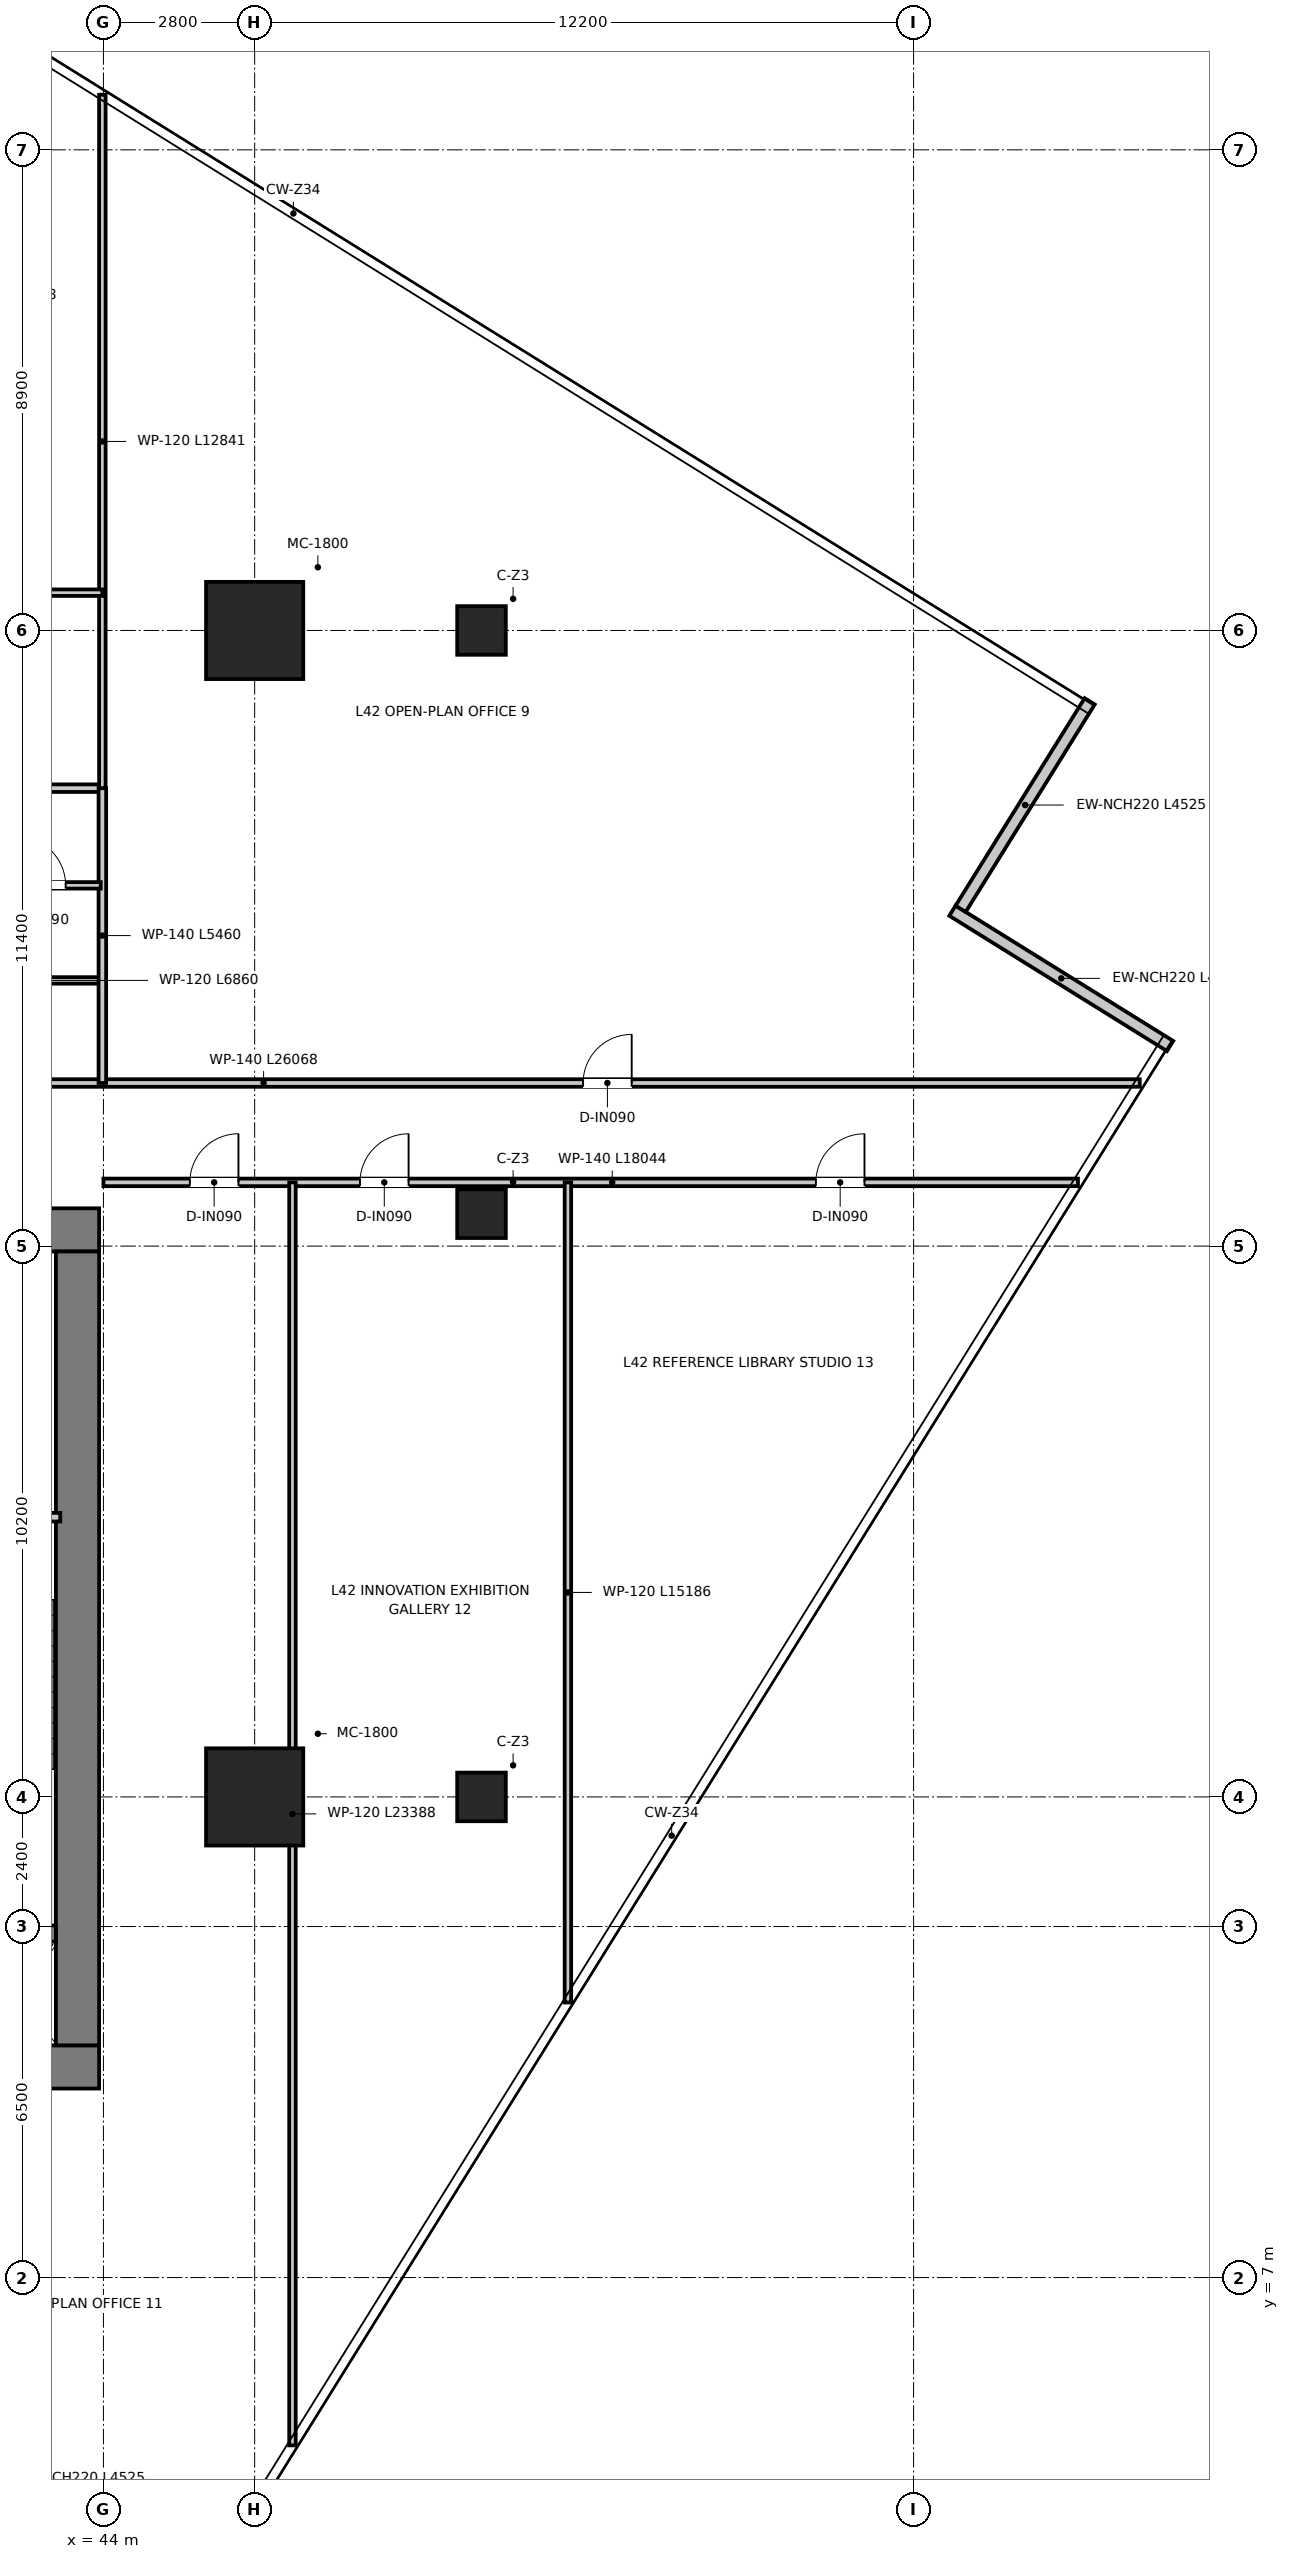
"""IFC4 building model, lengths in metres.
Left out: names, types, materials, properties, quantities, classifications, styles, units other than length and angle.
Written with IfcOpenShell. Run it as: python <this file> out.ifc"""

import sys

from ifc_helpers import new_model, si_unit, direction, frame, frame_2d, origin, origin_2d, place, context, subcontext, project, spatial, rectangle, extrude, source, transform, mapped, element, fill, save


model = new_model("IFC4")
c1 = context("Model", 3, precision=1e-05, world=origin(), true_north=direction((0.0, 1.0)))
c2 = subcontext(c1, "Body", "Model", "MODEL_VIEW")
j1 = project(units=[si_unit("LENGTHUNIT", "METRE"), si_unit("PLANEANGLEUNIT", "RADIAN")], contexts=[c1])
p1 = place(None, origin())
s1 = spatial("IfcSite", under=j1, at=p1, CompositionType="ELEMENT")
p2 = place(p1, origin())
s2 = spatial("IfcBuilding", under=s1, at=p2, CompositionType="ELEMENT")
p3 = place(p2, frame((0.0, 0.0, 173.85)))
s3 = spatial("IfcBuildingStorey", under=s2, at=p3, CompositionType="ELEMENT", Elevation=173.85)
p4 = place(p3, frame((28.08, 10.9, 0.0), z_axis=(0.0, 0.0, 1.0), x_axis=(1.0, 0.0, 0.0)))
e1 = element("IfcWall", 1, at=p4, inside=s3, PredefinedType="SHEAR", context=c2, shape_type="SweptSolid", body=[
    extrude(rectangle(XDim=15.84, YDim=0.8, at=frame_2d((7.92, 0.0))), origin(), (0.0, 0.0, 1.0), 3.95),
])
p5 = place(p3, frame((28.08, 26.4, 0.0), z_axis=(0.0, 0.0, 1.0), x_axis=(1.0, 0.0, 0.0)))
e2 = element("IfcWall", 2, at=p5, inside=s3, PredefinedType="SHEAR", context=c2, shape_type="SweptSolid", body=[
    extrude(rectangle(XDim=15.84, YDim=0.8, at=frame_2d((7.92, 0.0))), origin(), (0.0, 0.0, 1.0), 3.95),
])
p6 = place(p5, frame((7.22, 0.0, 0.0)))
e3 = element("IfcOpeningElement", 3, at=p6, cuts=e2, PredefinedType="OPENING", context=c2, shape_type="SweptSolid", body=[
    extrude(rectangle(XDim=1.4, YDim=2.2, at=frame_2d((0.7, 1.1))), frame((0.0, 0.41, 0.0), z_axis=(0.0, -1.0, 0.0), x_axis=(1.0, 0.0, 0.0)), (0.0, 0.0, 1.0), 0.82),
])
p7 = place(p5, frame((1.775, 0.0, 0.0)))
e4 = element("IfcOpeningElement", 4, at=p7, cuts=e2, PredefinedType="OPENING", context=c2, shape_type="SweptSolid", body=[
    extrude(rectangle(XDim=1.05, YDim=2.1, at=frame_2d((0.525, 1.05))), frame((0.0, 0.41, 0.0), z_axis=(0.0, -1.0, 0.0), x_axis=(1.0, 0.0, 0.0)), (0.0, 0.0, 1.0), 0.82),
])
p8 = place(p5, frame((13.015, 0.0, 0.0)))
e5 = element("IfcOpeningElement", 5, at=p8, cuts=e2, PredefinedType="OPENING", context=c2, shape_type="SweptSolid", body=[
    extrude(rectangle(XDim=1.05, YDim=2.1, at=frame_2d((0.525, 1.05))), frame((0.0, 0.41, 0.0), z_axis=(0.0, -1.0, 0.0), x_axis=(1.0, 0.0, 0.0)), (0.0, 0.0, 1.0), 0.82),
])
p9 = place(p3, frame((43.52, 11.3, 0.0), z_axis=(0.0, 0.0, 1.0), x_axis=(0.0, 1.0, 0.0)))
e6 = element("IfcWall", 6, at=p9, inside=s3, PredefinedType="SHEAR", context=c2, shape_type="SweptSolid", body=[
    extrude(rectangle(XDim=14.7, YDim=0.8, at=frame_2d((7.35, 0.0))), origin(), (0.0, 0.0, 1.0), 3.95),
])
p10 = place(p3, frame((40.02, 13.37, 0.0), z_axis=(0.0, 0.0, 1.0), x_axis=(1.0, 0.0, 0.0)))
e7 = element("IfcWall", 7, at=p10, inside=s3, PredefinedType="SHEAR", context=c2, shape_type="SweptSolid", body=[
    extrude(rectangle(XDim=3.1, YDim=0.3, at=frame_2d((1.55, 0.0))), origin(), (0.0, 0.0, 1.0), 3.95),
])
m1 = source(origin(), c2, "Body", "SweptSolid", [
    extrude(rectangle(XDim=1.8, YDim=1.8, at=origin_2d()), origin(), (0.0, 0.0, 1.0), 3.95),
])
for number, where, z_axis, x_axis in (
    (8, (46.8, 15.9, 0.0), (0.0, 0.0, 1.0), (1.0, 0.0, 0.0)),
    (9, (46.8, 37.5, 0.0), (0.0, 0.0, 1.0), (1.0, 0.0, 0.0)),
):
    element("IfcColumn", number, at=place(p3, frame(where, z_axis=z_axis, x_axis=x_axis)), inside=s3, PredefinedType="USERDEFINED", context=c2, shape_type="MappedRepresentation", body=[
        mapped(m1, transform((0.0, 0.0, 0.0), x_axis=(1.0, 0.0, 0.0), y_axis=(0.0, 1.0, 0.0), z_axis=(0.0, 0.0, 1.0), scale=1.0)),
    ])
m2 = source(origin(), c2, "Body", "SweptSolid", [
    extrude(rectangle(XDim=0.9, YDim=0.9, at=origin_2d()), origin(), (0.0, 0.0, 1.0), 3.95),
])
for number, where, z_axis, x_axis in (
    (10, (51.0, 37.5, 0.0), (0.0, 0.0, 1.0), (1.0, 0.0, 0.0)),
    (11, (51.0, 26.7, 0.0), (0.0, 0.0, 1.0), (1.0, 0.0, 0.0)),
    (12, (51.0, 15.9, 0.0), (0.0, 0.0, 1.0), (1.0, 0.0, 0.0)),
):
    element("IfcColumn", number, at=place(p3, frame(where, z_axis=z_axis, x_axis=x_axis)), inside=s3, PredefinedType="COLUMN", context=c2, shape_type="MappedRepresentation", body=[
        mapped(m2, transform((0.0, 0.0, 0.0), x_axis=(1.0, 0.0, 0.0), y_axis=(0.0, 1.0, 0.0), z_axis=(0.0, 0.0, 1.0), scale=1.0)),
    ])
p11 = place(p3, frame((63.749, 29.805, 0.0), z_axis=(0.0, 0.0, 1.0), x_axis=(-0.84921299194, 0.528050465694, 0.0)))
e13 = element("IfcWall", 13, at=p11, inside=s3, PredefinedType="ELEMENTEDWALL", context=c2, shape_type="SweptSolid", body=[
    extrude(rectangle(XDim=4.745, YDim=0.22, at=frame_2d((2.373, 0.0))), origin(), (0.0, 0.0, 1.0), 3.67),
])
p12 = place(p3, frame((59.871, 32.346, 0.0), z_axis=(0.0, 0.0, 1.0), x_axis=(0.528062437074, 0.849205547881, 0.0)))
e14 = element("IfcWall", 14, at=p12, inside=s3, PredefinedType="ELEMENTEDWALL", context=c2, shape_type="SweptSolid", body=[
    extrude(rectangle(XDim=4.525, YDim=0.22, at=frame_2d((2.262, 0.0))), origin(), (0.0, 0.0, 1.0), 3.67),
])
p13 = place(p3, frame((40.04, 21.08, 0.0), z_axis=(0.0, 0.0, 1.0), x_axis=(1.0, 0.0, 0.0)))
e15 = element("IfcWall", 15, at=p13, inside=s3, PredefinedType="PARTITIONING", context=c2, shape_type="SweptSolid", body=[
    extrude(rectangle(XDim=3.16, YDim=0.16, at=frame_2d((1.58, 0.0))), origin(), (0.0, 0.0, 1.0), 3.67),
])
p14 = place(p13, frame((1.055, 0.0, 0.0)))
e16 = element("IfcOpeningElement", 16, at=p14, cuts=e15, PredefinedType="OPENING", context=c2, shape_type="SweptSolid", body=[
    extrude(rectangle(XDim=1.05, YDim=2.1, at=frame_2d((0.525, 1.05))), frame((0.0, 0.09, 0.0), z_axis=(0.0, -1.0, 0.0), x_axis=(1.0, 0.0, 0.0)), (0.0, 0.0, 1.0), 0.18),
])
p15 = place(p3, frame((37.12, 29.12, 0.0), z_axis=(0.0, 0.0, 1.0), x_axis=(1.0, 0.0, 0.0)))
e17 = element("IfcWall", 17, at=p15, inside=s3, PredefinedType="PARTITIONING", context=c2, shape_type="SweptSolid", body=[
    extrude(rectangle(XDim=26.068, YDim=0.14, at=frame_2d((13.034, 0.0))), origin(), (0.0, 0.0, 1.0), 3.03),
])
p16 = place(p15, frame((3.03, 0.0, 0.0)))
e18 = element("IfcOpeningElement", 18, at=p16, cuts=e17, PredefinedType="OPENING", context=c2, shape_type="SweptSolid", body=[
    extrude(rectangle(XDim=0.9, YDim=2.1, at=frame_2d((0.45, 1.05))), frame((0.0, 0.08, 0.0), z_axis=(0.0, -1.0, 0.0), x_axis=(1.0, 0.0, 0.0)), (0.0, 0.0, 1.0), 0.16),
])
p17 = place(p15, frame((15.761, 0.0, 0.0)))
e19 = element("IfcOpeningElement", 19, at=p17, cuts=e17, PredefinedType="OPENING", context=c2, shape_type="SweptSolid", body=[
    extrude(rectangle(XDim=0.9, YDim=2.1, at=frame_2d((0.45, 1.05))), frame((0.0, 0.08, 0.0), z_axis=(0.0, -1.0, 0.0), x_axis=(1.0, 0.0, 0.0)), (0.0, 0.0, 1.0), 0.16),
])
p18 = place(p3, frame((44.0, 27.28, 0.0), z_axis=(0.0, 0.0, 1.0), x_axis=(1.0, 0.0, 0.0)))
e20 = element("IfcWall", 20, at=p18, inside=s3, PredefinedType="PARTITIONING", context=c2, shape_type="SweptSolid", body=[
    extrude(rectangle(XDim=18.044, YDim=0.14, at=frame_2d((9.022, 0.0))), origin(), (0.0, 0.0, 1.0), 3.03),
])
p19 = place(p18, frame((1.6, 0.0, 0.0)))
e21 = element("IfcOpeningElement", 21, at=p19, cuts=e20, PredefinedType="OPENING", context=c2, shape_type="SweptSolid", body=[
    extrude(rectangle(XDim=0.9, YDim=2.1, at=frame_2d((0.45, 1.05))), frame((0.0, 0.08, 0.0), z_axis=(0.0, -1.0, 0.0), x_axis=(1.0, 0.0, 0.0)), (0.0, 0.0, 1.0), 0.16),
])
p20 = place(p18, frame((4.75, 0.0, 0.0)))
e22 = element("IfcOpeningElement", 22, at=p20, cuts=e20, PredefinedType="OPENING", context=c2, shape_type="SweptSolid", body=[
    extrude(rectangle(XDim=0.9, YDim=2.1, at=frame_2d((0.45, 1.05))), frame((0.0, 0.08, 0.0), z_axis=(0.0, -1.0, 0.0), x_axis=(1.0, 0.0, 0.0)), (0.0, 0.0, 1.0), 0.16),
])
p21 = place(p18, frame((13.191, 0.0, 0.0)))
e23 = element("IfcOpeningElement", 23, at=p21, cuts=e20, PredefinedType="OPENING", context=c2, shape_type="SweptSolid", body=[
    extrude(rectangle(XDim=0.9, YDim=2.1, at=frame_2d((0.45, 1.05))), frame((0.0, 0.08, 0.0), z_axis=(0.0, -1.0, 0.0), x_axis=(1.0, 0.0, 0.0)), (0.0, 0.0, 1.0), 0.16),
])
p22 = place(p3, frame((37.12, 31.02, 0.0), z_axis=(0.0, 0.0, 1.0), x_axis=(1.0, 0.0, 0.0)))
e24 = element("IfcWall", 24, at=p22, inside=s3, PredefinedType="PARTITIONING", context=c2, shape_type="SweptSolid", body=[
    extrude(rectangle(XDim=6.86, YDim=0.12, at=frame_2d((3.43, 0.0))), origin(), (0.0, 0.0, 1.0), 3.08),
])
p23 = place(p3, frame((37.12, 34.58, 0.0), z_axis=(0.0, 0.0, 1.0), x_axis=(1.0, 0.0, 0.0)))
e25 = element("IfcWall", 25, at=p23, inside=s3, PredefinedType="PARTITIONING", context=c2, shape_type="SweptSolid", body=[
    extrude(rectangle(XDim=6.86, YDim=0.14, at=frame_2d((3.43, 0.0))), origin(), (0.0, 0.0, 1.0), 3.08),
])
p24 = place(p3, frame((43.98, 29.12, 0.0), z_axis=(0.0, 0.0, 1.0), x_axis=(0.0, 1.0, 0.0)))
e26 = element("IfcWall", 26, at=p24, inside=s3, PredefinedType="PARTITIONING", context=c2, shape_type="SweptSolid", body=[
    extrude(rectangle(XDim=5.46, YDim=0.14, at=frame_2d((2.73, 0.0))), origin(), (0.0, 0.0, 1.0), 3.31),
])
p25 = place(p3, frame((37.15, 32.78, 0.0), z_axis=(0.0, 0.0, 1.0), x_axis=(1.0, 0.0, 0.0)))
e27 = element("IfcWall", 27, at=p25, inside=s3, PredefinedType="PARTITIONING", context=c2, shape_type="SweptSolid", body=[
    extrude(rectangle(XDim=6.8, YDim=0.12, at=frame_2d((3.4, 0.0))), origin(), (0.0, 0.0, 1.0), 3.08),
])
p26 = place(p25, frame((0.725, 0.0, 0.0)))
e28 = element("IfcOpeningElement", 28, at=p26, cuts=e27, PredefinedType="OPENING", context=c2, shape_type="SweptSolid", body=[
    extrude(rectangle(XDim=0.85, YDim=2.1, at=frame_2d((0.425, 1.05))), frame((0.0, 0.07, 0.0), z_axis=(0.0, -1.0, 0.0), x_axis=(1.0, 0.0, 0.0)), (0.0, 0.0, 1.0), 0.14),
])
p27 = place(p25, frame((3.065, 0.0, 0.0)))
e29 = element("IfcOpeningElement", 29, at=p27, cuts=e27, PredefinedType="OPENING", context=c2, shape_type="SweptSolid", body=[
    extrude(rectangle(XDim=0.85, YDim=2.1, at=frame_2d((0.425, 1.05))), frame((0.0, 0.07, 0.0), z_axis=(0.0, -1.0, 0.0), x_axis=(1.0, 0.0, 0.0)), (0.0, 0.0, 1.0), 0.14),
])
p28 = place(p25, frame((5.25, 0.0, 0.0)))
e30 = element("IfcOpeningElement", 30, at=p28, cuts=e27, PredefinedType="OPENING", context=c2, shape_type="SweptSolid", body=[
    extrude(rectangle(XDim=0.9, YDim=2.1, at=frame_2d((0.45, 1.05))), frame((0.0, 0.07, 0.0), z_axis=(0.0, -1.0, 0.0), x_axis=(1.0, 0.0, 0.0)), (0.0, 0.0, 1.0), 0.14),
])
p29 = place(p3, frame((43.98, 34.58, 0.0), z_axis=(0.0, 0.0, 1.0), x_axis=(0.0, 1.0, 0.0)))
e31 = element("IfcWall", 31, at=p29, inside=s3, PredefinedType="PARTITIONING", context=c2, shape_type="SweptSolid", body=[
    extrude(rectangle(XDim=12.841, YDim=0.12, at=frame_2d((6.42, 0.0))), origin(), (0.0, 0.0, 1.0), 3.03),
])
p30 = place(p3, frame((37.12, 38.2, 0.0), z_axis=(0.0, 0.0, 1.0), x_axis=(1.0, 0.0, 0.0)))
e32 = element("IfcWall", 32, at=p30, inside=s3, PredefinedType="PARTITIONING", context=c2, shape_type="SweptSolid", body=[
    extrude(rectangle(XDim=6.86, YDim=0.12, at=frame_2d((3.43, 0.0))), origin(), (0.0, 0.0, 1.0), 3.08),
])
p31 = place(p3, frame((47.5, 3.892, 0.0), z_axis=(0.0, 0.0, 1.0), x_axis=(0.0, 1.0, 0.0)))
e33 = element("IfcWall", 33, at=p31, inside=s3, PredefinedType="PARTITIONING", context=c2, shape_type="SweptSolid", body=[
    extrude(rectangle(XDim=23.388, YDim=0.12, at=frame_2d((11.694, 0.0))), origin(), (0.0, 0.0, 1.0), 3.08),
])
p32 = place(p3, frame((52.6, 12.094, 0.0), z_axis=(0.0, 0.0, 1.0), x_axis=(0.0, 1.0, 0.0)))
e34 = element("IfcWall", 34, at=p32, inside=s3, PredefinedType="PARTITIONING", context=c2, shape_type="SweptSolid", body=[
    extrude(rectangle(XDim=15.187, YDim=0.12, at=frame_2d((7.593, 0.0))), origin(), (0.0, 0.0, 1.0), 3.67),
])
p33 = place(p28, origin())
e35 = element("IfcDoor", 35, at=p33, inside=s3, OperationType="SINGLE_SWING_LEFT", PredefinedType="DOOR", context=c2, shape_type="SweptSolid", body=[
    extrude(rectangle(XDim=0.9, YDim=2.1, at=frame_2d((0.45, 1.05))), frame((0.0, 0.025, 0.0), z_axis=(0.0, -1.0, 0.0), x_axis=(1.0, 0.0, 0.0)), (0.0, 0.0, 1.0), 0.05),
])
fill(e30, e35)
p34 = place(p17, origin())
e36 = element("IfcDoor", 36, at=p34, inside=s3, OperationType="SINGLE_SWING_RIGHT", PredefinedType="DOOR", context=c2, shape_type="SweptSolid", body=[
    extrude(rectangle(XDim=0.9, YDim=2.1, at=frame_2d((0.45, 1.05))), frame((0.0, 0.025, 0.0), z_axis=(0.0, -1.0, 0.0), x_axis=(1.0, 0.0, 0.0)), (0.0, 0.0, 1.0), 0.05),
])
fill(e19, e36)
p35 = place(p19, origin())
e37 = element("IfcDoor", 37, at=p35, inside=s3, OperationType="SINGLE_SWING_RIGHT", PredefinedType="DOOR", context=c2, shape_type="SweptSolid", body=[
    extrude(rectangle(XDim=0.9, YDim=2.1, at=frame_2d((0.45, 1.05))), frame((0.0, 0.025, 0.0), z_axis=(0.0, -1.0, 0.0), x_axis=(1.0, 0.0, 0.0)), (0.0, 0.0, 1.0), 0.05),
])
fill(e21, e37)
p36 = place(p20, origin())
e38 = element("IfcDoor", 38, at=p36, inside=s3, OperationType="SINGLE_SWING_RIGHT", PredefinedType="DOOR", context=c2, shape_type="SweptSolid", body=[
    extrude(rectangle(XDim=0.9, YDim=2.1, at=frame_2d((0.45, 1.05))), frame((0.0, 0.025, 0.0), z_axis=(0.0, -1.0, 0.0), x_axis=(1.0, 0.0, 0.0)), (0.0, 0.0, 1.0), 0.05),
])
fill(e22, e38)
p37 = place(p21, origin())
e39 = element("IfcDoor", 39, at=p37, inside=s3, OperationType="SINGLE_SWING_RIGHT", PredefinedType="DOOR", context=c2, shape_type="SweptSolid", body=[
    extrude(rectangle(XDim=0.9, YDim=2.1, at=frame_2d((0.45, 1.05))), frame((0.0, 0.025, 0.0), z_axis=(0.0, -1.0, 0.0), x_axis=(1.0, 0.0, 0.0)), (0.0, 0.0, 1.0), 0.05),
])
fill(e23, e39)
save(model, sys.argv[1])
